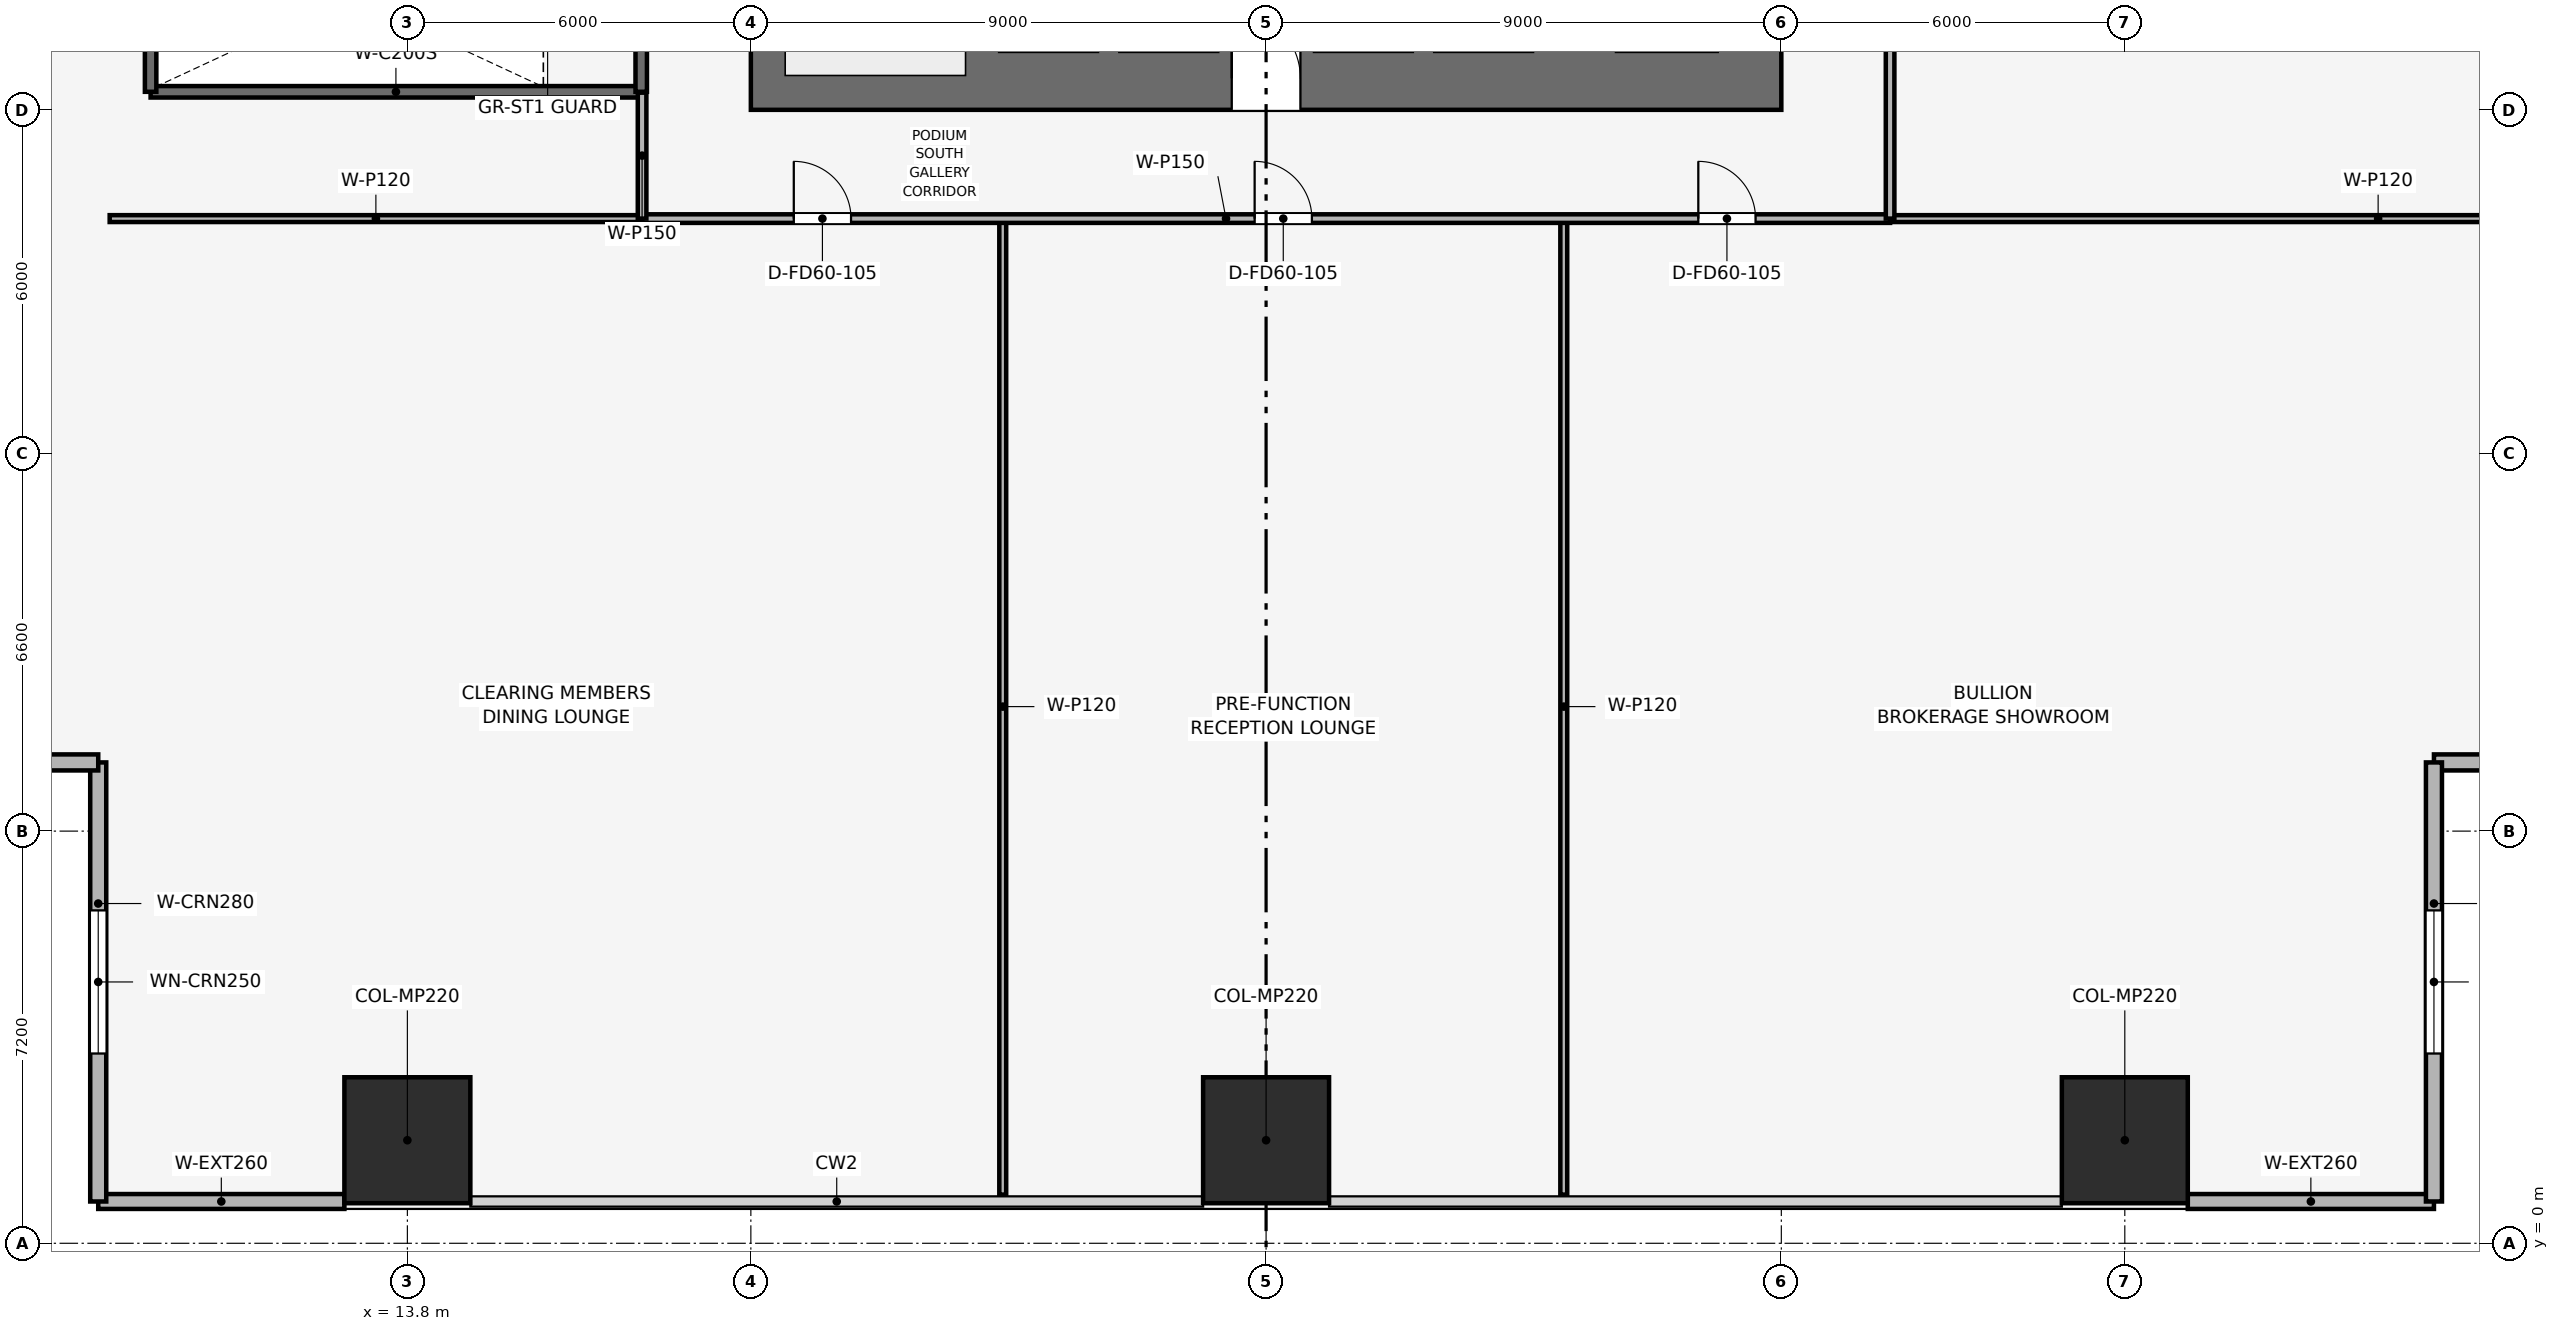
"""IFC4 building model, lengths in metres.
Left out: names, types, materials, properties, quantities, classifications, styles, units other than length and angle.
Written with IfcOpenShell. Run it as: python <this file> out.ifc"""

import sys

from ifc_helpers import new_model, si_unit, direction, frame, frame_2d, origin, origin_2d, place, context, subcontext, project, spatial, rectangle, extrude, element, fill, save


model = new_model("IFC4")
c1 = context("Model", 3, precision=1e-05, world=origin(), true_north=direction((0.0, 1.0)))
c2 = subcontext(c1, "Body", "Model", "MODEL_VIEW")
j1 = project(units=[si_unit("LENGTHUNIT", "METRE"), si_unit("PLANEANGLEUNIT", "RADIAN")], contexts=[c1])
p1 = place(None, origin())
s1 = spatial("IfcSite", under=j1, at=p1, CompositionType="ELEMENT")
p2 = place(p1, origin())
s2 = spatial("IfcBuilding", under=s1, at=p2, CompositionType="ELEMENT")
p3 = place(p2, frame((0.0, 0.0, 19.2)))
s3 = spatial("IfcBuildingStorey", under=s2, at=p3, CompositionType="ELEMENT", Elevation=19.2)
p4 = place(p3, frame((19.8, 20.35, 0.0), z_axis=(0.0, 0.0, 1.0), x_axis=(1.0, 0.0, 0.0)))
e1 = element("IfcWall", 1, at=p4, inside=s3, PredefinedType="SHEAR", context=c2, shape_type="SweptSolid", body=[
    extrude(rectangle(XDim=18.0, YDim=1.1, at=frame_2d((9.0, 0.0))), origin(), (0.0, 0.0, 1.0), 4.8),
])
p5 = place(p4, frame((8.4, 0.0, 0.0)))
e2 = element("IfcOpeningElement", 2, at=p5, cuts=e1, PredefinedType="OPENING", context=c2, shape_type="SweptSolid", body=[
    extrude(rectangle(XDim=1.2, YDim=2.2, at=frame_2d((0.6, 1.1))), frame((0.0, 0.56, 0.0), z_axis=(0.0, -1.0, 0.0), x_axis=(1.0, 0.0, 0.0)), (0.0, 0.0, 1.0), 1.12),
])
for number, where, z_axis, x_axis in (
    (3, (13.8, 1.8, 0.002), (0.0, 0.0, 1.0), (1.0, 0.0, 0.0)),
    (4, (28.8, 1.8, 0.002), (0.0, 0.0, 1.0), (1.0, 0.0, 0.0)),
    (5, (43.8, 1.8, 0.002), (0.0, 0.0, 1.0), (1.0, 0.0, 0.0)),
):
    element("IfcColumn", number, at=place(p3, frame(where, z_axis=z_axis, x_axis=x_axis)), inside=s3, PredefinedType="PILASTER", context=c2, shape_type="SweptSolid", body=[
        extrude(rectangle(XDim=2.2, YDim=2.2, at=origin_2d()), origin(), (0.0, 0.0, 1.0), 4.344),
    ])
for number, where, z_axis, x_axis in (
    (6, (12.7, 0.73, 0.0), (0.0, 0.0, 1.0), (-1.0, 0.0, 0.0)),
    (7, (49.2, 0.73, 0.0), (0.0, 0.0, 1.0), (-1.0, 0.0, 0.0)),
):
    element("IfcWall", number, at=place(p3, frame(where, z_axis=z_axis, x_axis=x_axis)), inside=s3, PredefinedType="SOLIDWALL", context=c2, shape_type="SweptSolid", body=[
        extrude(rectangle(XDim=4.3, YDim=0.26, at=frame_2d((2.15, 0.0))), origin(), (0.0, 0.0, 1.0), 4.35),
    ])
p6 = place(p3, frame((8.4, 0.73, 0.0), z_axis=(0.0, 0.0, 1.0), x_axis=(0.0, 1.0, 0.0)))
e8 = element("IfcWall", 8, at=p6, inside=s3, PredefinedType="SOLIDWALL", context=c2, shape_type="SweptSolid", body=[
    extrude(rectangle(XDim=7.67, YDim=0.28, at=frame_2d((3.835, 0.0))), origin(), (0.0, 0.0, 1.0), 4.35),
])
p7 = place(p6, frame((2.585, 0.0, 0.9)))
e9 = element("IfcOpeningElement", 9, at=p7, cuts=e8, PredefinedType="OPENING", context=c2, shape_type="SweptSolid", body=[
    extrude(rectangle(XDim=2.5, YDim=1.9, at=frame_2d((1.25, 0.95))), frame((0.0, 0.15, 0.0), z_axis=(0.0, -1.0, 0.0), x_axis=(1.0, 0.0, 0.0)), (0.0, 0.0, 1.0), 0.3),
])
p8 = place(p3, frame((8.4, 8.4, 0.0), z_axis=(0.0, 0.0, 1.0), x_axis=(-1.0, 0.0, 0.0)))
e10 = element("IfcWall", 10, at=p8, inside=s3, PredefinedType="SOLIDWALL", context=c2, shape_type="SweptSolid", body=[
    extrude(rectangle(XDim=7.67, YDim=0.28, at=frame_2d((3.835, 0.0))), origin(), (0.0, 0.0, 1.0), 4.35),
])
p9 = place(p8, frame((2.585, 0.0, 0.9)))
e11 = element("IfcOpeningElement", 11, at=p9, cuts=e10, PredefinedType="OPENING", context=c2, shape_type="SweptSolid", body=[
    extrude(rectangle(XDim=2.5, YDim=1.9, at=frame_2d((1.25, 0.95))), frame((0.0, 0.15, 0.0), z_axis=(0.0, -1.0, 0.0), x_axis=(1.0, 0.0, 0.0)), (0.0, 0.0, 1.0), 0.3),
])
p10 = place(p3, frame((56.87, 8.4, 0.0), z_axis=(0.0, 0.0, 1.0), x_axis=(-1.0, 0.0, 0.0)))
e12 = element("IfcWall", 12, at=p10, inside=s3, PredefinedType="SOLIDWALL", context=c2, shape_type="SweptSolid", body=[
    extrude(rectangle(XDim=7.67, YDim=0.28, at=frame_2d((3.835, 0.0))), origin(), (0.0, 0.0, 1.0), 4.35),
])
p11 = place(p10, frame((2.585, 0.0, 0.9)))
e13 = element("IfcOpeningElement", 13, at=p11, cuts=e12, PredefinedType="OPENING", context=c2, shape_type="SweptSolid", body=[
    extrude(rectangle(XDim=2.5, YDim=1.9, at=frame_2d((1.25, 0.95))), frame((0.0, 0.15, 0.0), z_axis=(0.0, -1.0, 0.0), x_axis=(1.0, 0.0, 0.0)), (0.0, 0.0, 1.0), 0.3),
])
p12 = place(p3, frame((49.2, 8.4, 0.0), z_axis=(0.0, 0.0, 1.0), x_axis=(0.0, -1.0, 0.0)))
e14 = element("IfcWall", 14, at=p12, inside=s3, PredefinedType="SOLIDWALL", context=c2, shape_type="SweptSolid", body=[
    extrude(rectangle(XDim=7.67, YDim=0.28, at=frame_2d((3.835, 0.0))), origin(), (0.0, 0.0, 1.0), 4.35),
])
p13 = place(p12, frame((2.585, 0.0, 0.9)))
e15 = element("IfcOpeningElement", 15, at=p13, cuts=e14, PredefinedType="OPENING", context=c2, shape_type="SweptSolid", body=[
    extrude(rectangle(XDim=2.5, YDim=1.9, at=frame_2d((1.25, 0.95))), frame((0.0, 0.15, 0.0), z_axis=(0.0, -1.0, 0.0), x_axis=(1.0, 0.0, 0.0)), (0.0, 0.0, 1.0), 0.3),
])
p14 = place(p3, frame((9.315, 20.115, 0.0), z_axis=(0.0, 0.0, 1.0), x_axis=(1.0, 0.0, 0.0)))
e16 = element("IfcWall", 16, at=p14, inside=s3, PredefinedType="SHEAR", context=c2, shape_type="SweptSolid", body=[
    extrude(rectangle(XDim=8.57, YDim=0.2, at=frame_2d((4.285, 0.0))), origin(), (0.0, 0.0, 1.0), 4.35),
])
p15 = place(p3, frame((9.315, 20.115, 0.0), z_axis=(0.0, 0.0, 1.0), x_axis=(0.0, 1.0, 0.0)))
e17 = element("IfcWall", 17, at=p15, inside=s3, PredefinedType="SHEAR", context=c2, shape_type="SweptSolid", body=[
    extrude(rectangle(XDim=3.32, YDim=0.2, at=frame_2d((1.66, 0.0))), origin(), (0.0, 0.0, 1.0), 4.35),
])
p16 = place(p3, frame((17.885, 20.115, 0.0), z_axis=(0.0, 0.0, 1.0), x_axis=(0.0, 1.0, 0.0)))
e18 = element("IfcWall", 18, at=p16, inside=s3, PredefinedType="SHEAR", context=c2, shape_type="SweptSolid", body=[
    extrude(rectangle(XDim=3.32, YDim=0.2, at=frame_2d((1.66, 0.0))), origin(), (0.0, 0.0, 1.0), 4.35),
])
p17 = place(p16, frame((0.9, 0.0, 0.0)))
e19 = element("IfcOpeningElement", 19, at=p17, cuts=e18, PredefinedType="OPENING", context=c2, shape_type="SweptSolid", body=[
    extrude(rectangle(XDim=1.1, YDim=2.15, at=frame_2d((0.55, 1.075))), frame((0.0, 0.11, 0.0), z_axis=(0.0, -1.0, 0.0), x_axis=(1.0, 0.0, 0.0)), (0.0, 0.0, 1.0), 0.22),
])
for number, where, z_axis, x_axis in (
    (20, (24.2, 0.85, 0.0), (0.0, 0.0, 1.0), (0.0, 1.0, 0.0)),
    (21, (34.0, 0.85, 0.0), (0.0, 0.0, 1.0), (0.0, 1.0, 0.0)),
):
    element("IfcWall", number, at=place(p3, frame(where, z_axis=z_axis, x_axis=x_axis)), inside=s3, PredefinedType="PARTITIONING", context=c2, shape_type="SweptSolid", body=[
        extrude(rectangle(XDim=17.05, YDim=0.12, at=frame_2d((8.525, 0.0))), origin(), (0.0, 0.0, 1.0), 3.335),
    ])
p18 = place(p3, frame((8.6, 17.9, 0.0), z_axis=(0.0, 0.0, 1.0), x_axis=(1.0, 0.0, 0.0)))
e22 = element("IfcWall", 22, at=p18, inside=s3, PredefinedType="PARTITIONING", context=c2, shape_type="SweptSolid", body=[
    extrude(rectangle(XDim=9.3, YDim=0.12, at=frame_2d((4.65, 0.0))), origin(), (0.0, 0.0, 1.0), 4.35),
])
p19 = place(p3, frame((39.7, 17.9, 0.0), z_axis=(0.0, 0.0, 1.0), x_axis=(1.0, 0.0, 0.0)))
e23 = element("IfcWall", 23, at=p19, inside=s3, PredefinedType="PARTITIONING", context=c2, shape_type="SweptSolid", body=[
    extrude(rectangle(XDim=17.05, YDim=0.12, at=frame_2d((8.525, 0.0))), origin(), (0.0, 0.0, 1.0), 3.335),
])
p20 = place(p3, frame((17.9, 17.9, 0.0), z_axis=(0.0, 0.0, 1.0), x_axis=(1.0, 0.0, 0.0)))
e24 = element("IfcWall", 24, at=p20, inside=s3, PredefinedType="PARTITIONING", context=c2, shape_type="SweptSolid", body=[
    extrude(rectangle(XDim=21.8, YDim=0.15, at=frame_2d((10.9, 0.0))), origin(), (0.0, 0.0, 1.0), 3.435),
])
p21 = place(p20, frame((2.65, 0.0, 0.0)))
e25 = element("IfcOpeningElement", 25, at=p21, cuts=e24, PredefinedType="OPENING", context=c2, shape_type="SweptSolid", body=[
    extrude(rectangle(XDim=1.0, YDim=2.15, at=frame_2d((0.5, 1.075))), frame((0.0, 0.085, 0.0), z_axis=(0.0, -1.0, 0.0), x_axis=(1.0, 0.0, 0.0)), (0.0, 0.0, 1.0), 0.17),
])
p22 = place(p20, frame((10.7, 0.0, 0.0)))
e26 = element("IfcOpeningElement", 26, at=p22, cuts=e24, PredefinedType="OPENING", context=c2, shape_type="SweptSolid", body=[
    extrude(rectangle(XDim=1.0, YDim=2.15, at=frame_2d((0.5, 1.075))), frame((0.0, 0.085, 0.0), z_axis=(0.0, -1.0, 0.0), x_axis=(1.0, 0.0, 0.0)), (0.0, 0.0, 1.0), 0.17),
])
p23 = place(p20, frame((18.45, 0.0, 0.0)))
e27 = element("IfcOpeningElement", 27, at=p23, cuts=e24, PredefinedType="OPENING", context=c2, shape_type="SweptSolid", body=[
    extrude(rectangle(XDim=1.0, YDim=2.15, at=frame_2d((0.5, 1.075))), frame((0.0, 0.085, 0.0), z_axis=(0.0, -1.0, 0.0), x_axis=(1.0, 0.0, 0.0)), (0.0, 0.0, 1.0), 0.17),
])
p24 = place(p3, frame((17.9, 17.9, 0.0), z_axis=(0.0, 0.0, 1.0), x_axis=(0.0, 1.0, 0.0)))
e28 = element("IfcWall", 28, at=p24, inside=s3, PredefinedType="PARTITIONING", context=c2, shape_type="SweptSolid", body=[
    extrude(rectangle(XDim=2.2, YDim=0.15, at=frame_2d((1.1, 0.0))), origin(), (0.0, 0.0, 1.0), 4.35),
])
p25 = place(p3, frame((39.7, 17.9, 0.0), z_axis=(0.0, 0.0, 1.0), x_axis=(0.0, 1.0, 0.0)))
e29 = element("IfcWall", 29, at=p25, inside=s3, PredefinedType="PARTITIONING", context=c2, shape_type="SweptSolid", body=[
    extrude(rectangle(XDim=16.25, YDim=0.15, at=frame_2d((8.125, 0.0))), origin(), (0.0, 0.0, 1.0), 3.435),
])
p26 = place(p25, frame((3.05, 0.0, 0.0)))
e30 = element("IfcOpeningElement", 30, at=p26, cuts=e29, PredefinedType="OPENING", context=c2, shape_type="SweptSolid", body=[
    extrude(rectangle(XDim=1.0, YDim=2.15, at=frame_2d((0.5, 1.075))), frame((0.0, 0.085, 0.0), z_axis=(0.0, -1.0, 0.0), x_axis=(1.0, 0.0, 0.0)), (0.0, 0.0, 1.0), 0.17),
])
p27 = place(p25, frame((9.5, 0.0, 0.0)))
e31 = element("IfcOpeningElement", 31, at=p27, cuts=e29, PredefinedType="OPENING", context=c2, shape_type="SweptSolid", body=[
    extrude(rectangle(XDim=1.0, YDim=2.15, at=frame_2d((0.5, 1.075))), frame((0.0, 0.085, 0.0), z_axis=(0.0, -1.0, 0.0), x_axis=(1.0, 0.0, 0.0)), (0.0, 0.0, 1.0), 0.17),
])
p28 = place(p25, frame((14.075, 0.0, 0.0)))
e32 = element("IfcOpeningElement", 32, at=p28, cuts=e29, PredefinedType="OPENING", context=c2, shape_type="SweptSolid", body=[
    extrude(rectangle(XDim=1.0, YDim=2.15, at=frame_2d((0.5, 1.075))), frame((0.0, 0.085, 0.0), z_axis=(0.0, -1.0, 0.0), x_axis=(1.0, 0.0, 0.0)), (0.0, 0.0, 1.0), 0.17),
])
p29 = place(p7, origin())
e33 = element("IfcWindow", 33, at=p29, inside=s3, PartitioningType="SINGLE_PANEL", PredefinedType="WINDOW", context=c2, shape_type="SweptSolid", body=[
    extrude(rectangle(XDim=2.5, YDim=1.9, at=frame_2d((1.25, 0.95))), frame((0.0, 0.03, 0.0), z_axis=(0.0, -1.0, 0.0), x_axis=(1.0, 0.0, 0.0)), (0.0, 0.0, 1.0), 0.06),
])
fill(e9, e33)
p30 = place(p13, origin())
e34 = element("IfcWindow", 34, at=p30, inside=s3, PartitioningType="SINGLE_PANEL", PredefinedType="WINDOW", context=c2, shape_type="SweptSolid", body=[
    extrude(rectangle(XDim=2.5, YDim=1.9, at=frame_2d((1.25, 0.95))), frame((0.0, 0.03, 0.0), z_axis=(0.0, -1.0, 0.0), x_axis=(1.0, 0.0, 0.0)), (0.0, 0.0, 1.0), 0.06),
])
fill(e15, e34)
p31 = place(p21, origin())
e35 = element("IfcDoor", 35, at=p31, inside=s3, OperationType="SINGLE_SWING_LEFT", PredefinedType="DOOR", context=c2, shape_type="SweptSolid", body=[
    extrude(rectangle(XDim=1.0, YDim=2.15, at=frame_2d((0.5, 1.075))), frame((0.0, 0.025, 0.0), z_axis=(0.0, -1.0, 0.0), x_axis=(1.0, 0.0, 0.0)), (0.0, 0.0, 1.0), 0.05),
])
fill(e25, e35)
p32 = place(p22, origin())
e36 = element("IfcDoor", 36, at=p32, inside=s3, OperationType="SINGLE_SWING_LEFT", PredefinedType="DOOR", context=c2, shape_type="SweptSolid", body=[
    extrude(rectangle(XDim=1.0, YDim=2.15, at=frame_2d((0.5, 1.075))), frame((0.0, 0.025, 0.0), z_axis=(0.0, -1.0, 0.0), x_axis=(1.0, 0.0, 0.0)), (0.0, 0.0, 1.0), 0.05),
])
fill(e26, e36)
p33 = place(p23, origin())
e37 = element("IfcDoor", 37, at=p33, inside=s3, OperationType="SINGLE_SWING_LEFT", PredefinedType="DOOR", context=c2, shape_type="SweptSolid", body=[
    extrude(rectangle(XDim=1.0, YDim=2.15, at=frame_2d((0.5, 1.075))), frame((0.0, 0.025, 0.0), z_axis=(0.0, -1.0, 0.0), x_axis=(1.0, 0.0, 0.0)), (0.0, 0.0, 1.0), 0.05),
])
fill(e27, e37)
p34 = place(p5, origin())
e38 = element("IfcDoor", 38, at=p34, inside=s3, OperationType="SINGLE_SWING_LEFT", PredefinedType="DOOR", context=c2, shape_type="SweptSolid", body=[
    extrude(rectangle(XDim=1.2, YDim=2.2, at=frame_2d((0.6, 1.1))), frame((0.0, 0.025, 0.0), z_axis=(0.0, -1.0, 0.0), x_axis=(1.0, 0.0, 0.0)), (0.0, 0.0, 1.0), 0.05),
])
fill(e2, e38)
save(model, sys.argv[1])
